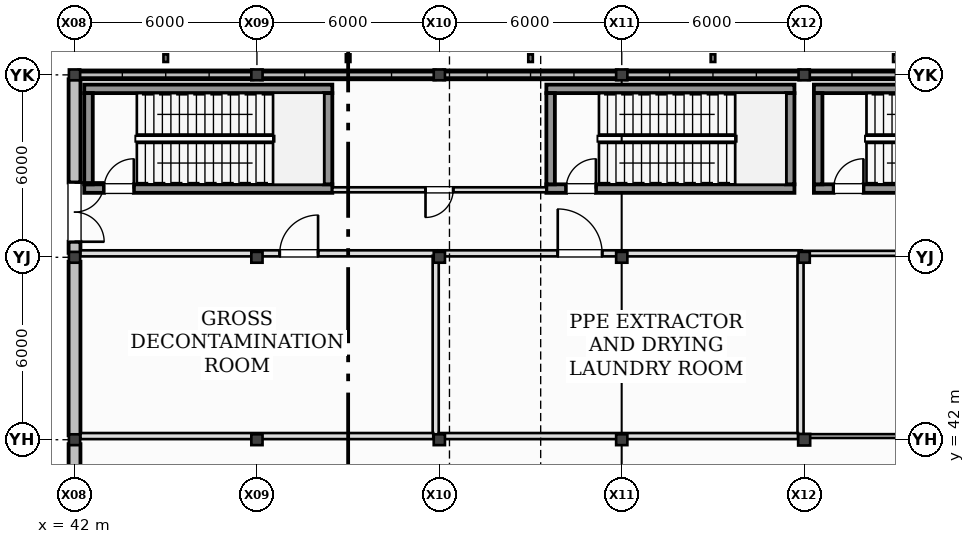
"""IFC4 building model, lengths in metres.
Left out: names, types, materials, properties, quantities, classifications, styles, units other than length and angle.
Written with IfcOpenShell. Run it as: python <this file> out.ifc"""

import sys

from ifc_helpers import new_model, si_unit, direction, frame, frame_2d, origin, origin_2d, place, context, subcontext, project, spatial, rectangle, hollow_rectangle, i_section, extrude, element, fill, save


model = new_model("IFC4")
c1 = context("Model", 3, precision=1e-05, world=origin(), true_north=direction((0.0, 1.0)))
c2 = subcontext(c1, "Body", "Model", "MODEL_VIEW")
j1 = project(units=[si_unit("LENGTHUNIT", "METRE"), si_unit("PLANEANGLEUNIT", "RADIAN")], contexts=[c1])
p1 = place(None, origin())
s1 = spatial("IfcSite", under=j1, at=p1, CompositionType="ELEMENT")
p2 = place(p1, origin())
s2 = spatial("IfcBuilding", under=s1, at=p2, CompositionType="ELEMENT")
p3 = place(p2, origin())
s3 = spatial("IfcBuildingStorey", under=s2, at=p3, CompositionType="ELEMENT", Elevation=0.0)
for number, where, z_axis, x_axis in (
    (1, (42.0, 42.0, -0.41), (0.0, 0.0, 1.0), (1.0, 0.0, 0.0)),
    (2, (42.0, 48.0, -0.41), (0.0, 0.0, 1.0), (1.0, 0.0, 0.0)),
    (3, (42.0, 54.0, -0.41), (0.0, 0.0, 1.0), (1.0, 0.0, 0.0)),
    (4, (48.0, 42.0, -0.41), (0.0, 0.0, 1.0), (1.0, 0.0, 0.0)),
    (5, (48.0, 48.0, -0.41), (0.0, 0.0, 1.0), (1.0, 0.0, 0.0)),
    (6, (48.0, 54.0, -0.41), (0.0, 0.0, 1.0), (1.0, 0.0, 0.0)),
    (7, (54.0, 42.0, -0.41), (0.0, 0.0, 1.0), (1.0, 0.0, 0.0)),
    (8, (54.0, 48.0, -0.41), (0.0, 0.0, 1.0), (1.0, 0.0, 0.0)),
    (9, (54.0, 54.0, -0.41), (0.0, 0.0, 1.0), (1.0, 0.0, 0.0)),
    (10, (60.0, 42.0, -0.41), (0.0, 0.0, 1.0), (1.0, 0.0, 0.0)),
    (11, (60.0, 48.0, -0.41), (0.0, 0.0, 1.0), (1.0, 0.0, 0.0)),
    (12, (60.0, 54.0, -0.41), (0.0, 0.0, 1.0), (1.0, 0.0, 0.0)),
):
    element("IfcColumn", number, at=place(p3, frame(where, z_axis=z_axis, x_axis=x_axis)), inside=s3, PredefinedType="COLUMN", context=c2, shape_type="SweptSolid", body=[
        extrude(i_section(OverallWidth=0.369, OverallDepth=0.356, WebThickness=0.011, FlangeThickness=0.018, at=origin_2d()), origin(), (0.0, 0.0, 1.0), 6.41),
    ])
p4 = place(p3, frame((66.0, 42.0, -0.41), z_axis=(0.0, 0.0, 1.0), x_axis=(1.0, 0.0, 0.0)))
e13 = element("IfcColumn", 13, at=p4, inside=s3, PredefinedType="COLUMN", context=c2, shape_type="SweptSolid", body=[
    extrude(i_section(OverallWidth=0.395, OverallDepth=0.38, WebThickness=0.019, FlangeThickness=0.03, at=origin_2d()), origin(), (0.0, 0.0, 1.0), 6.41),
])
for number, where, z_axis, x_axis in (
    (14, (66.0, 48.0, -0.41), (0.0, 0.0, 1.0), (1.0, 0.0, 0.0)),
    (15, (66.0, 54.0, -0.41), (0.0, 0.0, 1.0), (1.0, 0.0, 0.0)),
):
    element("IfcColumn", number, at=place(p3, frame(where, z_axis=z_axis, x_axis=x_axis)), inside=s3, PredefinedType="COLUMN", context=c2, shape_type="SweptSolid", body=[
        extrude(i_section(OverallWidth=0.369, OverallDepth=0.356, WebThickness=0.011, FlangeThickness=0.018, at=origin_2d()), origin(), (0.0, 0.0, 1.0), 6.41),
    ])
for number, where, z_axis, x_axis in (
    (16, (45.0, 54.55, -0.35), (0.0, 0.0, 1.0), (1.0, 0.0, 0.0)),
    (17, (51.0, 54.55, -0.35), (0.0, 0.0, 1.0), (1.0, 0.0, 0.0)),
    (18, (57.0, 54.55, -0.35), (0.0, 0.0, 1.0), (1.0, 0.0, 0.0)),
    (19, (63.0, 54.55, -0.35), (0.0, 0.0, 1.0), (1.0, 0.0, 0.0)),
    (20, (69.0, 54.55, -0.35), (0.0, 0.0, 1.0), (1.0, 0.0, 0.0)),
):
    element("IfcColumn", number, at=place(p3, frame(where, z_axis=z_axis, x_axis=x_axis)), inside=s3, PredefinedType="PILASTER", context=c2, shape_type="SweptSolid", body=[
        extrude(hollow_rectangle(XDim=0.15, YDim=0.25, WallThickness=0.008, at=origin_2d()), origin(), (0.0, 0.0, 1.0), 6.35),
    ])
p5 = place(p3, frame((47.855, 54.0, 0.0), z_axis=(0.0, 0.0, 1.0), x_axis=(-1.0, 0.0, 0.0)))
e21 = element("IfcWall", 21, at=p5, inside=s3, PredefinedType="STANDARD", context=c2, shape_type="SweptSolid", body=[
    extrude(rectangle(XDim=5.71, YDim=0.29, at=frame_2d((2.855, 0.0))), origin(), (0.0, 0.0, 1.0), 0.56),
])
p6 = place(p3, frame((53.855, 54.0, 0.0), z_axis=(0.0, 0.0, 1.0), x_axis=(-1.0, 0.0, 0.0)))
e22 = element("IfcWall", 22, at=p6, inside=s3, PredefinedType="STANDARD", context=c2, shape_type="SweptSolid", body=[
    extrude(rectangle(XDim=5.71, YDim=0.29, at=frame_2d((2.855, 0.0))), origin(), (0.0, 0.0, 1.0), 0.68),
])
p7 = place(p3, frame((59.855, 54.0, 0.0), z_axis=(0.0, 0.0, 1.0), x_axis=(-1.0, 0.0, 0.0)))
e23 = element("IfcWall", 23, at=p7, inside=s3, PredefinedType="STANDARD", context=c2, shape_type="SweptSolid", body=[
    extrude(rectangle(XDim=5.71, YDim=0.29, at=frame_2d((2.855, 0.0))), origin(), (0.0, 0.0, 1.0), 0.8),
])
p8 = place(p3, frame((65.855, 54.0, 0.0), z_axis=(0.0, 0.0, 1.0), x_axis=(-1.0, 0.0, 0.0)))
e24 = element("IfcWall", 24, at=p8, inside=s3, PredefinedType="STANDARD", context=c2, shape_type="SweptSolid", body=[
    extrude(rectangle(XDim=5.71, YDim=0.29, at=frame_2d((2.855, 0.0))), origin(), (0.0, 0.0, 1.0), 0.92),
])
p9 = place(p3, frame((71.855, 54.0, 0.0), z_axis=(0.0, 0.0, 1.0), x_axis=(-1.0, 0.0, 0.0)))
e25 = element("IfcWall", 25, at=p9, inside=s3, PredefinedType="STANDARD", context=c2, shape_type="SweptSolid", body=[
    extrude(rectangle(XDim=5.71, YDim=0.29, at=frame_2d((2.855, 0.0))), origin(), (0.0, 0.0, 1.0), 0.32),
])
p10 = place(p3, frame((42.0, 41.855, 0.0), z_axis=(0.0, 0.0, 1.0), x_axis=(0.0, -1.0, 0.0)))
e26 = element("IfcWall", 26, at=p10, inside=s3, PredefinedType="STANDARD", context=c2, shape_type="SweptSolid", body=[
    extrude(rectangle(XDim=5.71, YDim=0.39, at=frame_2d((2.855, 0.0))), origin(), (0.0, 0.0, 1.0), 6.0),
])
p11 = place(p10, frame((1.555, 0.0, 1.0)))
e27 = element("IfcOpeningElement", 27, at=p11, cuts=e26, PredefinedType="OPENING", context=c2, shape_type="SweptSolid", body=[
    extrude(rectangle(XDim=2.6, YDim=1.36, at=frame_2d((1.3, 0.68))), frame((0.0, 0.205, 0.0), z_axis=(0.0, -1.0, 0.0), x_axis=(1.0, 0.0, 0.0)), (0.0, 0.0, 1.0), 0.41),
])
p12 = place(p3, frame((42.0, 47.855, 0.0), z_axis=(0.0, 0.0, 1.0), x_axis=(0.0, -1.0, 0.0)))
e28 = element("IfcWall", 28, at=p12, inside=s3, PredefinedType="STANDARD", context=c2, shape_type="SweptSolid", body=[
    extrude(rectangle(XDim=5.71, YDim=0.39, at=frame_2d((2.855, 0.0))), origin(), (0.0, 0.0, 1.0), 5.044),
])
p13 = place(p3, frame((42.0, 53.855, 0.0), z_axis=(0.0, 0.0, 1.0), x_axis=(0.0, -1.0, 0.0)))
e29 = element("IfcWall", 29, at=p13, inside=s3, PredefinedType="STANDARD", context=c2, shape_type="SweptSolid", body=[
    extrude(rectangle(XDim=5.71, YDim=0.39, at=frame_2d((2.855, 0.0))), origin(), (0.0, 0.0, 1.0), 5.044),
])
p14 = place(p13, frame((3.394, 0.0, 0.0)))
e30 = element("IfcOpeningElement", 30, at=p14, cuts=e29, PredefinedType="OPENING", context=c2, shape_type="SweptSolid", body=[
    extrude(rectangle(XDim=1.95, YDim=2.35, at=frame_2d((0.975, 1.175))), frame((0.0, 0.205, 0.0), z_axis=(0.0, -1.0, 0.0), x_axis=(1.0, 0.0, 0.0)), (0.0, 0.0, 1.0), 0.41),
])
p15 = place(p3, frame((42.32, 50.26, 0.0), z_axis=(0.0, 0.0, 1.0), x_axis=(1.0, 0.0, 0.0)))
e31 = element("IfcWall", 31, at=p15, inside=s3, PredefinedType="SHEAR", context=c2, shape_type="SweptSolid", body=[
    extrude(rectangle(XDim=8.16, YDim=0.28, at=frame_2d((4.08, 0.0))), origin(), (0.0, 0.0, 1.0), 6.0),
])
p16 = place(p15, frame((0.65, 0.0, 0.0)))
e32 = element("IfcOpeningElement", 32, at=p16, cuts=e31, PredefinedType="OPENING", context=c2, shape_type="SweptSolid", body=[
    extrude(rectangle(XDim=0.98, YDim=2.15, at=frame_2d((0.49, 1.075))), frame((0.0, 0.15, 0.0), z_axis=(0.0, -1.0, 0.0), x_axis=(1.0, 0.0, 0.0)), (0.0, 0.0, 1.0), 0.3),
])
p17 = place(p3, frame((50.48, 53.54, 0.0), z_axis=(0.0, 0.0, 1.0), x_axis=(-1.0, 0.0, 0.0)))
e33 = element("IfcWall", 33, at=p17, inside=s3, PredefinedType="SHEAR", context=c2, shape_type="SweptSolid", body=[
    extrude(rectangle(XDim=8.16, YDim=0.28, at=frame_2d((4.08, 0.0))), origin(), (0.0, 0.0, 1.0), 6.0),
])
for number, where, z_axis, x_axis in (
    (34, (42.46, 53.4, 0.0), (0.0, 0.0, 1.0), (0.0, -1.0, 0.0)),
    (35, (50.34, 50.4, 0.0), (0.0, 0.0, 1.0), (0.0, 1.0, 0.0)),
):
    element("IfcWall", number, at=place(p3, frame(where, z_axis=z_axis, x_axis=x_axis)), inside=s3, PredefinedType="SHEAR", context=c2, shape_type="SweptSolid", body=[
        extrude(rectangle(XDim=3.0, YDim=0.28, at=frame_2d((1.5, 0.0))), origin(), (0.0, 0.0, 1.0), 6.0),
    ])
p18 = place(p3, frame((57.52, 50.26, 0.0), z_axis=(0.0, 0.0, 1.0), x_axis=(1.0, 0.0, 0.0)))
e36 = element("IfcWall", 36, at=p18, inside=s3, PredefinedType="SHEAR", context=c2, shape_type="SweptSolid", body=[
    extrude(rectangle(XDim=8.16, YDim=0.28, at=frame_2d((4.08, 0.0))), origin(), (0.0, 0.0, 1.0), 6.0),
])
p19 = place(p18, frame((0.65, 0.0, 0.0)))
e37 = element("IfcOpeningElement", 37, at=p19, cuts=e36, PredefinedType="OPENING", context=c2, shape_type="SweptSolid", body=[
    extrude(rectangle(XDim=0.98, YDim=2.15, at=frame_2d((0.49, 1.075))), frame((0.0, 0.15, 0.0), z_axis=(0.0, -1.0, 0.0), x_axis=(1.0, 0.0, 0.0)), (0.0, 0.0, 1.0), 0.3),
])
p20 = place(p3, frame((65.68, 53.54, 0.0), z_axis=(0.0, 0.0, 1.0), x_axis=(-1.0, 0.0, 0.0)))
e38 = element("IfcWall", 38, at=p20, inside=s3, PredefinedType="SHEAR", context=c2, shape_type="SweptSolid", body=[
    extrude(rectangle(XDim=8.16, YDim=0.28, at=frame_2d((4.08, 0.0))), origin(), (0.0, 0.0, 1.0), 6.0),
])
for number, where, z_axis, x_axis in (
    (39, (57.66, 53.4, 0.0), (0.0, 0.0, 1.0), (0.0, -1.0, 0.0)),
    (40, (65.54, 50.4, 0.0), (0.0, 0.0, 1.0), (0.0, 1.0, 0.0)),
):
    element("IfcWall", number, at=place(p3, frame(where, z_axis=z_axis, x_axis=x_axis)), inside=s3, PredefinedType="SHEAR", context=c2, shape_type="SweptSolid", body=[
        extrude(rectangle(XDim=3.0, YDim=0.28, at=frame_2d((1.5, 0.0))), origin(), (0.0, 0.0, 1.0), 6.0),
    ])
p21 = place(p3, frame((66.32, 50.26, 0.0), z_axis=(0.0, 0.0, 1.0), x_axis=(1.0, 0.0, 0.0)))
e41 = element("IfcWall", 41, at=p21, inside=s3, PredefinedType="SHEAR", context=c2, shape_type="SweptSolid", body=[
    extrude(rectangle(XDim=8.16, YDim=0.28, at=frame_2d((4.08, 0.0))), origin(), (0.0, 0.0, 1.0), 6.0),
])
p22 = place(p21, frame((0.65, 0.0, 0.0)))
e42 = element("IfcOpeningElement", 42, at=p22, cuts=e41, PredefinedType="OPENING", context=c2, shape_type="SweptSolid", body=[
    extrude(rectangle(XDim=0.98, YDim=2.15, at=frame_2d((0.49, 1.075))), frame((0.0, 0.15, 0.0), z_axis=(0.0, -1.0, 0.0), x_axis=(1.0, 0.0, 0.0)), (0.0, 0.0, 1.0), 0.3),
])
p23 = place(p3, frame((74.48, 53.54, 0.0), z_axis=(0.0, 0.0, 1.0), x_axis=(-1.0, 0.0, 0.0)))
e43 = element("IfcWall", 43, at=p23, inside=s3, PredefinedType="SHEAR", context=c2, shape_type="SweptSolid", body=[
    extrude(rectangle(XDim=8.16, YDim=0.28, at=frame_2d((4.08, 0.0))), origin(), (0.0, 0.0, 1.0), 6.0),
])
p24 = place(p3, frame((66.46, 53.4, 0.0), z_axis=(0.0, 0.0, 1.0), x_axis=(0.0, -1.0, 0.0)))
e44 = element("IfcWall", 44, at=p24, inside=s3, PredefinedType="SHEAR", context=c2, shape_type="SweptSolid", body=[
    extrude(rectangle(XDim=3.0, YDim=0.28, at=frame_2d((1.5, 0.0))), origin(), (0.0, 0.0, 1.0), 6.0),
])
p25 = place(p3, frame((42.195, 48.13, 0.0), z_axis=(0.0, 0.0, 1.0), x_axis=(1.0, 0.0, 0.0)))
e45 = element("IfcWall", 45, at=p25, inside=s3, PredefinedType="PARTITIONING", context=c2, shape_type="SweptSolid", body=[
    extrude(rectangle(XDim=11.725, YDim=0.2, at=frame_2d((5.862, 0.0))), origin(), (0.0, 0.0, 1.0), 5.035),
])
p26 = place(p25, frame((6.556, 0.0, 0.0)))
e46 = element("IfcOpeningElement", 46, at=p26, cuts=e45, PredefinedType="OPENING", context=c2, shape_type="SweptSolid", body=[
    extrude(rectangle(XDim=1.26, YDim=2.2, at=frame_2d((0.63, 1.1))), frame((0.0, 0.11, 0.0), z_axis=(0.0, -1.0, 0.0), x_axis=(1.0, 0.0, 0.0)), (0.0, 0.0, 1.0), 0.22),
])
p27 = place(p3, frame((53.88, 48.05, 0.0), z_axis=(0.0, 0.0, 1.0), x_axis=(0.0, -1.0, 0.0)))
e47 = element("IfcWall", 47, at=p27, inside=s3, PredefinedType="PARTITIONING", context=c2, shape_type="SweptSolid", body=[
    extrude(rectangle(XDim=5.97, YDim=0.2, at=frame_2d((2.985, 0.0))), origin(), (0.0, 0.0, 1.0), 5.044),
])
p28 = place(p3, frame((53.8, 42.12, 0.0), z_axis=(0.0, 0.0, 1.0), x_axis=(-1.0, 0.0, 0.0)))
e48 = element("IfcWall", 48, at=p28, inside=s3, PredefinedType="PARTITIONING", context=c2, shape_type="SweptSolid", body=[
    extrude(rectangle(XDim=11.605, YDim=0.2, at=frame_2d((5.802, 0.0))), origin(), (0.0, 0.0, 1.0), 5.035),
])
p29 = place(p3, frame((53.98, 48.13, 0.0), z_axis=(0.0, 0.0, 1.0), x_axis=(1.0, 0.0, 0.0)))
e49 = element("IfcWall", 49, at=p29, inside=s3, PredefinedType="PARTITIONING", context=c2, shape_type="SweptSolid", body=[
    extrude(rectangle(XDim=11.94, YDim=0.2, at=frame_2d((5.97, 0.0))), origin(), (0.0, 0.0, 1.0), 5.035),
])
p30 = place(p29, frame((3.915, 0.0, 0.0)))
e50 = element("IfcOpeningElement", 50, at=p30, cuts=e49, PredefinedType="OPENING", context=c2, shape_type="SweptSolid", body=[
    extrude(rectangle(XDim=1.46, YDim=2.3, at=frame_2d((0.73, 1.15))), frame((0.0, 0.11, 0.0), z_axis=(0.0, -1.0, 0.0), x_axis=(1.0, 0.0, 0.0)), (0.0, 0.0, 1.0), 0.22),
])
p31 = place(p3, frame((65.88, 48.05, 0.0), z_axis=(0.0, 0.0, 1.0), x_axis=(0.0, -1.0, 0.0)))
e51 = element("IfcWall", 51, at=p31, inside=s3, PredefinedType="PARTITIONING", context=c2, shape_type="SweptSolid", body=[
    extrude(rectangle(XDim=5.97, YDim=0.2, at=frame_2d((2.985, 0.0))), origin(), (0.0, 0.0, 1.0), 5.044),
])
p32 = place(p3, frame((65.8, 42.12, 0.0), z_axis=(0.0, 0.0, 1.0), x_axis=(-1.0, 0.0, 0.0)))
e52 = element("IfcWall", 52, at=p32, inside=s3, PredefinedType="PARTITIONING", context=c2, shape_type="SweptSolid", body=[
    extrude(rectangle(XDim=11.82, YDim=0.2, at=frame_2d((5.91, 0.0))), origin(), (0.0, 0.0, 1.0), 5.035),
])
p33 = place(p3, frame((65.98, 48.13, 0.0), z_axis=(0.0, 0.0, 1.0), x_axis=(1.0, 0.0, 0.0)))
e53 = element("IfcWall", 53, at=p33, inside=s3, PredefinedType="PARTITIONING", context=c2, shape_type="SweptSolid", body=[
    extrude(rectangle(XDim=11.923, YDim=0.165, at=frame_2d((5.961, 0.0))), origin(), (0.0, 0.0, 1.0), 5.035),
])
p34 = place(p33, frame((3.973, 0.0, 0.0)))
e54 = element("IfcOpeningElement", 54, at=p34, cuts=e53, PredefinedType="OPENING", context=c2, shape_type="SweptSolid", body=[
    extrude(rectangle(XDim=1.06, YDim=2.25, at=frame_2d((0.53, 1.125))), frame((0.0, 0.093, 0.0), z_axis=(0.0, -1.0, 0.0), x_axis=(1.0, 0.0, 0.0)), (0.0, 0.0, 1.0), 0.185),
])
p35 = place(p3, frame((77.817, 42.12, 0.0), z_axis=(0.0, 0.0, 1.0), x_axis=(-1.0, 0.0, 0.0)))
e55 = element("IfcWall", 55, at=p35, inside=s3, PredefinedType="PARTITIONING", context=c2, shape_type="SweptSolid", body=[
    extrude(rectangle(XDim=11.837, YDim=0.125, at=frame_2d((5.919, 0.0))), origin(), (0.0, 0.0, 1.0), 5.035),
])
p36 = place(p3, frame((57.52, 50.22, 0.0), z_axis=(0.0, 0.0, 1.0), x_axis=(-1.0, 0.0, 0.0)))
e56 = element("IfcWall", 56, at=p36, inside=s3, PredefinedType="PARTITIONING", context=c2, shape_type="SweptSolid", body=[
    extrude(rectangle(XDim=7.04, YDim=0.165, at=frame_2d((3.52, 0.0))), origin(), (0.0, 0.0, 1.0), 5.68),
])
p37 = place(p36, frame((3.065, 0.0, 0.0)))
e57 = element("IfcOpeningElement", 57, at=p37, cuts=e56, PredefinedType="OPENING", context=c2, shape_type="SweptSolid", body=[
    extrude(rectangle(XDim=0.91, YDim=2.1, at=frame_2d((0.455, 1.05))), frame((0.0, 0.093, 0.0), z_axis=(0.0, -1.0, 0.0), x_axis=(1.0, 0.0, 0.0)), (0.0, 0.0, 1.0), 0.185),
])
p38 = place(p14, frame((1.95, 0.0, 0.0), z_axis=(0.0, 0.0, 1.0), x_axis=(-1.0, 0.0, 0.0)))
e58 = element("IfcDoor", 58, at=p38, inside=s3, OperationType="DOUBLE_DOOR_SINGLE_SWING", PredefinedType="DOOR", context=c2, shape_type="SweptSolid", body=[
    extrude(rectangle(XDim=1.95, YDim=2.35, at=frame_2d((0.975, 1.175))), frame((0.0, 0.025, 0.0), z_axis=(0.0, -1.0, 0.0), x_axis=(1.0, 0.0, 0.0)), (0.0, 0.0, 1.0), 0.05),
])
fill(e30, e58)
p39 = place(p16, origin())
e59 = element("IfcDoor", 59, at=p39, inside=s3, OperationType="SINGLE_SWING_RIGHT", PredefinedType="DOOR", context=c2, shape_type="SweptSolid", body=[
    extrude(rectangle(XDim=0.98, YDim=2.15, at=frame_2d((0.49, 1.075))), frame((0.0, 0.025, 0.0), z_axis=(0.0, -1.0, 0.0), x_axis=(1.0, 0.0, 0.0)), (0.0, 0.0, 1.0), 0.05),
])
fill(e32, e59)
p40 = place(p19, origin())
e60 = element("IfcDoor", 60, at=p40, inside=s3, OperationType="SINGLE_SWING_RIGHT", PredefinedType="DOOR", context=c2, shape_type="SweptSolid", body=[
    extrude(rectangle(XDim=0.98, YDim=2.15, at=frame_2d((0.49, 1.075))), frame((0.0, 0.025, 0.0), z_axis=(0.0, -1.0, 0.0), x_axis=(1.0, 0.0, 0.0)), (0.0, 0.0, 1.0), 0.05),
])
fill(e37, e60)
p41 = place(p22, origin())
e61 = element("IfcDoor", 61, at=p41, inside=s3, OperationType="SINGLE_SWING_RIGHT", PredefinedType="DOOR", context=c2, shape_type="SweptSolid", body=[
    extrude(rectangle(XDim=0.98, YDim=2.15, at=frame_2d((0.49, 1.075))), frame((0.0, 0.025, 0.0), z_axis=(0.0, -1.0, 0.0), x_axis=(1.0, 0.0, 0.0)), (0.0, 0.0, 1.0), 0.05),
])
fill(e42, e61)
p42 = place(p26, frame((1.26, 0.0, 0.0), z_axis=(0.0, 0.0, 1.0), x_axis=(-1.0, 0.0, 0.0)))
e62 = element("IfcDoor", 62, at=p42, inside=s3, OperationType="SINGLE_SWING_RIGHT", PredefinedType="DOOR", context=c2, shape_type="SweptSolid", body=[
    extrude(rectangle(XDim=1.26, YDim=2.2, at=frame_2d((0.63, 1.1))), frame((0.0, 0.025, 0.0), z_axis=(0.0, -1.0, 0.0), x_axis=(1.0, 0.0, 0.0)), (0.0, 0.0, 1.0), 0.05),
])
fill(e46, e62)
p43 = place(p30, frame((1.46, 0.0, 0.0), z_axis=(0.0, 0.0, 1.0), x_axis=(-1.0, 0.0, 0.0)))
e63 = element("IfcDoor", 63, at=p43, inside=s3, OperationType="SINGLE_SWING_LEFT", PredefinedType="DOOR", context=c2, shape_type="SweptSolid", body=[
    extrude(rectangle(XDim=1.46, YDim=2.3, at=frame_2d((0.73, 1.15))), frame((0.0, 0.025, 0.0), z_axis=(0.0, -1.0, 0.0), x_axis=(1.0, 0.0, 0.0)), (0.0, 0.0, 1.0), 0.05),
])
fill(e50, e63)
p44 = place(p37, frame((0.91, 0.0, 0.0), z_axis=(0.0, 0.0, 1.0), x_axis=(-1.0, 0.0, 0.0)))
e64 = element("IfcDoor", 64, at=p44, inside=s3, OperationType="SINGLE_SWING_RIGHT", PredefinedType="DOOR", context=c2, shape_type="SweptSolid", body=[
    extrude(rectangle(XDim=0.91, YDim=2.1, at=frame_2d((0.455, 1.05))), frame((0.0, 0.025, 0.0), z_axis=(0.0, -1.0, 0.0), x_axis=(1.0, 0.0, 0.0)), (0.0, 0.0, 1.0), 0.05),
])
fill(e57, e64)
save(model, sys.argv[1])
